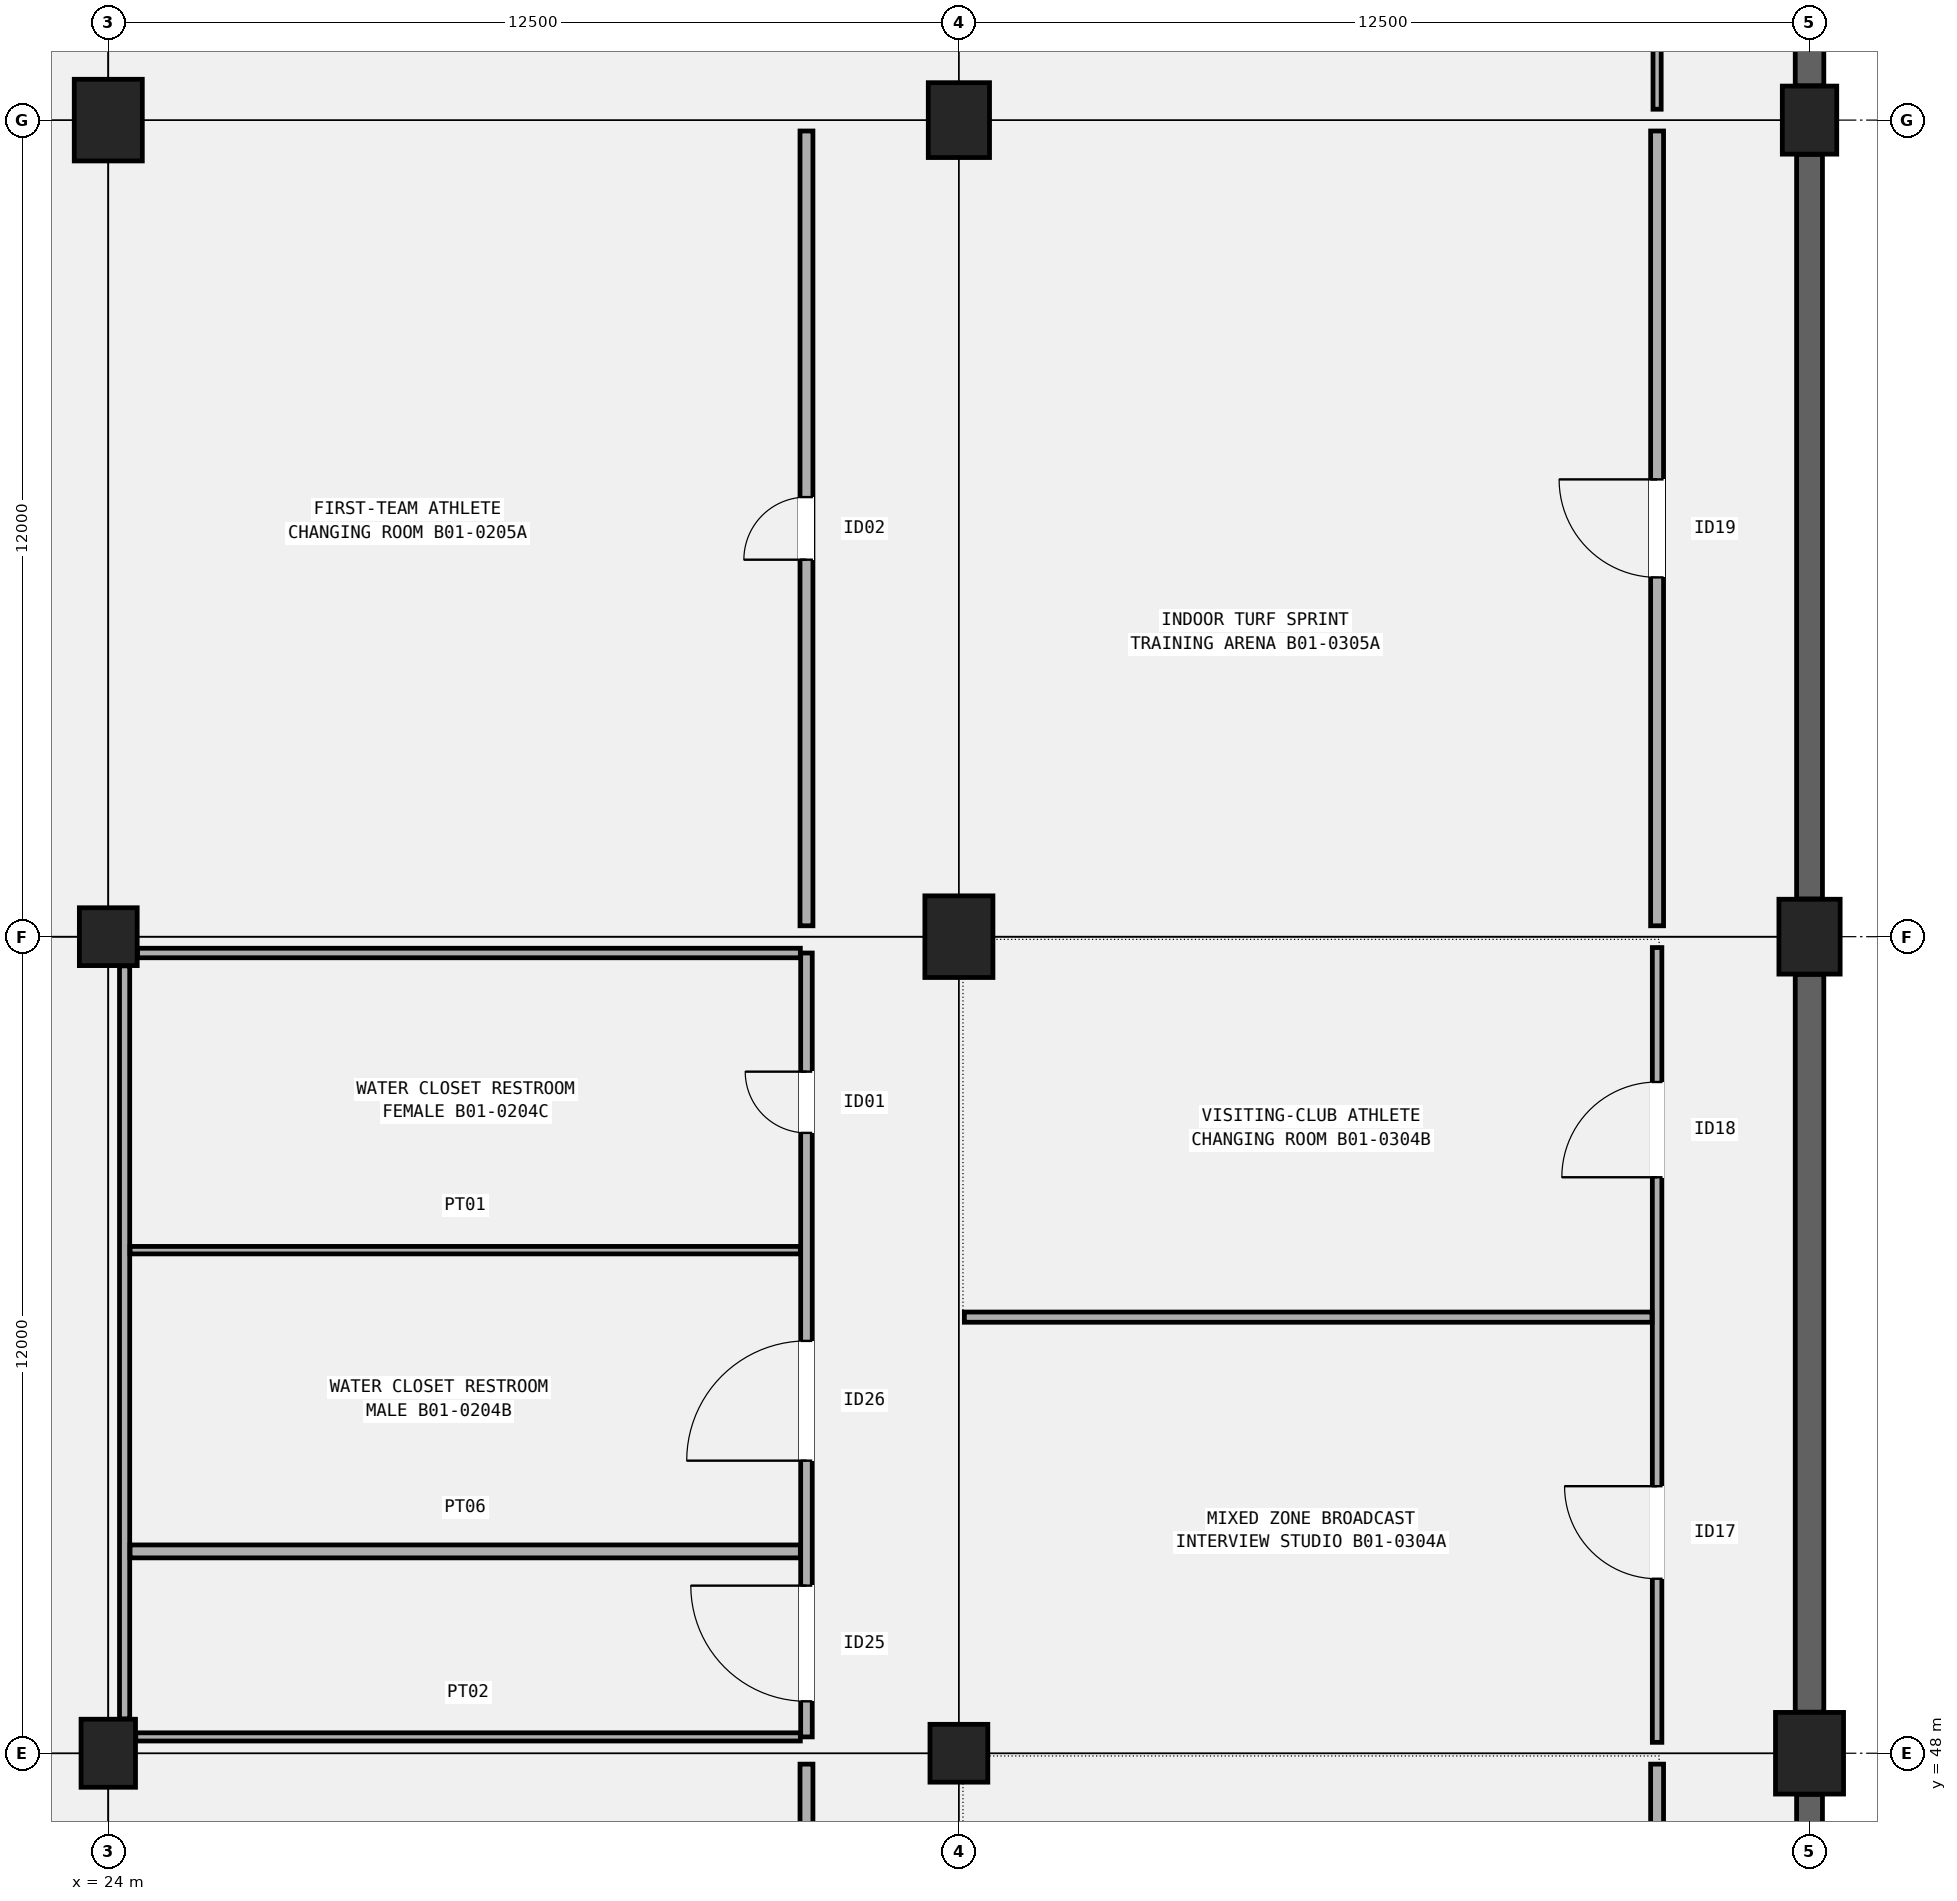
"""IFC4 building model, lengths in metres.
Left out: names, types, materials, properties, quantities, classifications, styles, units other than length and angle.
Written with IfcOpenShell. Run it as: python <this file> out.ifc"""

import sys

from ifc_helpers import new_model, si_unit, direction, frame, frame_2d, origin, origin_2d, place, context, subcontext, project, spatial, rectangle, circle, extrude, element, fill, save


model = new_model("IFC4")
c1 = context("Model", 3, precision=1e-05, world=origin(), true_north=direction((0.0, 1.0)))
c2 = subcontext(c1, "Body", "Model", "MODEL_VIEW")
j1 = project(units=[si_unit("LENGTHUNIT", "METRE"), si_unit("PLANEANGLEUNIT", "RADIAN")], contexts=[c1])
p1 = place(None, origin())
s1 = spatial("IfcSite", under=j1, at=p1, CompositionType="ELEMENT")
p2 = place(p1, origin())
s2 = spatial("IfcBuilding", under=s1, at=p2, CompositionType="ELEMENT")
p3 = place(p2, frame((0.0, 0.0, -4.8)))
s3 = spatial("IfcBuildingStorey", under=s2, at=p3, CompositionType="ELEMENT", Elevation=-4.8)
p4 = place(p3, frame((24.0, 48.0, 0.0), z_axis=(0.0, 0.0, 1.0), x_axis=(1.0, 0.0, 0.0)))
e1 = element("IfcColumn", 1, at=p4, inside=s3, PredefinedType="COLUMN", context=c2, shape_type="SweptSolid", body=[
    extrude(rectangle(XDim=0.8, YDim=1.0, at=origin_2d()), origin(), (0.0, 0.0, 1.0), 4.8),
])
p5 = place(p3, frame((24.0, 60.0, 0.0), z_axis=(0.0, 0.0, 1.0), x_axis=(1.0, 0.0, 0.0)))
e2 = element("IfcColumn", 2, at=p5, inside=s3, PredefinedType="COLUMN", context=c2, shape_type="SweptSolid", body=[
    extrude(circle(Radius=0.425, at=origin_2d()), origin(), (0.0, 0.0, 1.0), 4.8),
])
p6 = place(p3, frame((24.0, 72.0, 0.0), z_axis=(0.0, 0.0, 1.0), x_axis=(1.0, 0.0, 0.0)))
e3 = element("IfcColumn", 3, at=p6, inside=s3, PredefinedType="COLUMN", context=c2, shape_type="SweptSolid", body=[
    extrude(rectangle(XDim=1.0, YDim=1.2, at=origin_2d()), origin(), (0.0, 0.0, 1.0), 4.8),
])
p7 = place(p3, frame((36.5, 48.0, 0.0), z_axis=(0.0, 0.0, 1.0), x_axis=(1.0, 0.0, 0.0)))
e4 = element("IfcColumn", 4, at=p7, inside=s3, PredefinedType="COLUMN", context=c2, shape_type="SweptSolid", body=[
    extrude(circle(Radius=0.425, at=origin_2d()), origin(), (0.0, 0.0, 1.0), 4.8),
])
p8 = place(p3, frame((36.5, 60.0, 0.0), z_axis=(0.0, 0.0, 1.0), x_axis=(1.0, 0.0, 0.0)))
e5 = element("IfcColumn", 5, at=p8, inside=s3, PredefinedType="COLUMN", context=c2, shape_type="SweptSolid", body=[
    extrude(rectangle(XDim=1.0, YDim=1.2, at=origin_2d()), origin(), (0.0, 0.0, 1.0), 4.8),
])
p9 = place(p3, frame((36.5, 72.0, 0.0), z_axis=(0.0, 0.0, 1.0), x_axis=(1.0, 0.0, 0.0)))
e6 = element("IfcColumn", 6, at=p9, inside=s3, PredefinedType="COLUMN", context=c2, shape_type="SweptSolid", body=[
    extrude(rectangle(XDim=0.9, YDim=1.1, at=origin_2d()), origin(), (0.0, 0.0, 1.0), 4.8),
])
p10 = place(p3, frame((49.0, 48.0, 0.0), z_axis=(0.0, 0.0, 1.0), x_axis=(1.0, 0.0, 0.0)))
e7 = element("IfcColumn", 7, at=p10, inside=s3, PredefinedType="COLUMN", context=c2, shape_type="SweptSolid", body=[
    extrude(rectangle(XDim=1.0, YDim=1.2, at=origin_2d()), origin(), (0.0, 0.0, 1.0), 4.8),
])
p11 = place(p3, frame((49.0, 60.0, 0.0), z_axis=(0.0, 0.0, 1.0), x_axis=(1.0, 0.0, 0.0)))
e8 = element("IfcColumn", 8, at=p11, inside=s3, PredefinedType="COLUMN", context=c2, shape_type="SweptSolid", body=[
    extrude(rectangle(XDim=0.9, YDim=1.1, at=origin_2d()), origin(), (0.0, 0.0, 1.0), 4.8),
])
p12 = place(p3, frame((49.0, 72.0, 0.0), z_axis=(0.0, 0.0, 1.0), x_axis=(1.0, 0.0, 0.0)))
e9 = element("IfcColumn", 9, at=p12, inside=s3, PredefinedType="COLUMN", context=c2, shape_type="SweptSolid", body=[
    extrude(rectangle(XDim=0.8, YDim=1.0, at=origin_2d()), origin(), (0.0, 0.0, 1.0), 4.8),
])
p13 = place(p3, frame((49.0, 36.429, 0.0), z_axis=(0.0, 0.0, 1.0), x_axis=(0.0, 1.0, 0.0)))
e10 = element("IfcWall", 10, at=p13, inside=s3, PredefinedType="STANDARD", context=c2, shape_type="SweptSolid", body=[
    extrude(rectangle(XDim=10.967, YDim=0.38, at=frame_2d((5.483, 0.0))), origin(), (0.0, 0.0, 1.0), 4.46),
])
p14 = place(p3, frame((49.0, 48.604, 0.0), z_axis=(0.0, 0.0, 1.0), x_axis=(0.0, 1.0, 0.0)))
e11 = element("IfcWall", 11, at=p14, inside=s3, PredefinedType="STANDARD", context=c2, shape_type="SweptSolid", body=[
    extrude(rectangle(XDim=10.842, YDim=0.42, at=frame_2d((5.421, 0.0))), origin(), (0.0, 0.0, 1.0), 4.46),
])
p15 = place(p3, frame((49.0, 60.554, 0.0), z_axis=(0.0, 0.0, 1.0), x_axis=(0.0, 1.0, 0.0)))
e12 = element("IfcWall", 12, at=p15, inside=s3, PredefinedType="STANDARD", context=c2, shape_type="SweptSolid", body=[
    extrude(rectangle(XDim=10.942, YDim=0.38, at=frame_2d((5.471, 0.0))), origin(), (0.0, 0.0, 1.0), 4.46),
])
p16 = place(p3, frame((49.0, 72.504, 0.0), z_axis=(0.0, 0.0, 1.0), x_axis=(0.0, 1.0, 0.0)))
e13 = element("IfcWall", 13, at=p16, inside=s3, PredefinedType="STANDARD", context=c2, shape_type="SweptSolid", body=[
    extrude(rectangle(XDim=11.067, YDim=0.42, at=frame_2d((5.534, 0.0))), origin(), (0.0, 0.0, 1.0), 4.46),
])
p17 = place(p3, frame((34.26, 38.17, 0.0), z_axis=(0.0, 0.0, 1.0), x_axis=(0.0, 1.0, 0.0)))
e14 = element("IfcWall", 14, at=p17, inside=s3, PredefinedType="PARTITIONING", context=c2, shape_type="SweptSolid", body=[
    extrude(rectangle(XDim=9.67, YDim=0.19, at=frame_2d((4.835, 0.0))), origin(), (0.0, 0.0, 1.0), 3.92),
])
p18 = place(p17, frame((4.01, 0.0, 0.0)))
e15 = element("IfcOpeningElement", 15, at=p18, cuts=e14, PredefinedType="OPENING", context=c2, shape_type="SweptSolid", body=[
    extrude(rectangle(XDim=1.65, YDim=2.28, at=frame_2d((0.825, 1.14))), frame((0.0, 0.105, 0.0), z_axis=(0.0, -1.0, 0.0), x_axis=(1.0, 0.0, 0.0)), (0.0, 0.0, 1.0), 0.21),
])
p19 = place(p3, frame((34.26, 48.24, 0.0), z_axis=(0.0, 0.0, 1.0), x_axis=(0.0, 1.0, 0.0)))
e16 = element("IfcWall", 16, at=p19, inside=s3, PredefinedType="PARTITIONING", context=c2, shape_type="SweptSolid", body=[
    extrude(rectangle(XDim=11.52, YDim=0.17, at=frame_2d((5.76, 0.0))), origin(), (0.0, 0.0, 1.0), 3.92),
])
p20 = place(p19, frame((0.523, 0.0, 0.0)))
e17 = element("IfcOpeningElement", 17, at=p20, cuts=e16, PredefinedType="OPENING", context=c2, shape_type="SweptSolid", body=[
    extrude(rectangle(XDim=1.7, YDim=2.32, at=frame_2d((0.85, 1.16))), frame((0.0, 0.095, 0.0), z_axis=(0.0, -1.0, 0.0), x_axis=(1.0, 0.0, 0.0)), (0.0, 0.0, 1.0), 0.19),
])
p21 = place(p19, frame((4.06, 0.0, 0.0)))
e18 = element("IfcOpeningElement", 18, at=p21, cuts=e16, PredefinedType="OPENING", context=c2, shape_type="SweptSolid", body=[
    extrude(rectangle(XDim=1.76, YDim=2.3, at=frame_2d((0.88, 1.15))), frame((0.0, 0.095, 0.0), z_axis=(0.0, -1.0, 0.0), x_axis=(1.0, 0.0, 0.0)), (0.0, 0.0, 1.0), 0.19),
])
p22 = place(p19, frame((8.876, 0.0, 0.0)))
e19 = element("IfcOpeningElement", 19, at=p22, cuts=e16, PredefinedType="OPENING", context=c2, shape_type="SweptSolid", body=[
    extrude(rectangle(XDim=0.9, YDim=2.06, at=frame_2d((0.45, 1.03))), frame((0.0, 0.095, 0.0), z_axis=(0.0, -1.0, 0.0), x_axis=(1.0, 0.0, 0.0)), (0.0, 0.0, 1.0), 0.19),
])
p23 = place(p3, frame((24.404, 48.24, 0.0), z_axis=(0.0, 0.0, 1.0), x_axis=(1.0, 0.0, 0.0)))
e20 = element("IfcWall", 20, at=p23, inside=s3, PredefinedType="PARTITIONING", context=c2, shape_type="SweptSolid", body=[
    extrude(rectangle(XDim=9.766, YDim=0.12, at=frame_2d((4.883, 0.0))), origin(), (0.0, 0.0, 1.0), 3.52),
])
p24 = place(p3, frame((24.429, 59.76, 0.0), z_axis=(0.0, 0.0, 1.0), x_axis=(1.0, 0.0, 0.0)))
e21 = element("IfcWall", 21, at=p24, inside=s3, PredefinedType="PARTITIONING", context=c2, shape_type="SweptSolid", body=[
    extrude(rectangle(XDim=9.741, YDim=0.14, at=frame_2d((4.871, 0.0))), origin(), (0.0, 0.0, 1.0), 3.62),
])
p25 = place(p3, frame((24.24, 48.504, 0.0), z_axis=(0.0, 0.0, 1.0), x_axis=(0.0, 1.0, 0.0)))
e22 = element("IfcWall", 22, at=p25, inside=s3, PredefinedType="PARTITIONING", context=c2, shape_type="SweptSolid", body=[
    extrude(rectangle(XDim=11.067, YDim=0.15, at=frame_2d((5.534, 0.0))), origin(), (0.0, 0.0, 1.0), 3.52),
])
p26 = place(p3, frame((24.32, 50.966, 0.0), z_axis=(0.0, 0.0, 1.0), x_axis=(1.0, 0.0, 0.0)))
e23 = element("IfcWall", 23, at=p26, inside=s3, PredefinedType="PARTITIONING", context=c2, shape_type="SweptSolid", body=[
    extrude(rectangle(XDim=9.85, YDim=0.19, at=frame_2d((4.925, 0.0))), origin(), (0.0, 0.0, 1.0), 3.92),
])
p27 = place(p3, frame((24.32, 55.393, 0.0), z_axis=(0.0, 0.0, 1.0), x_axis=(1.0, 0.0, 0.0)))
e24 = element("IfcWall", 24, at=p27, inside=s3, PredefinedType="PARTITIONING", context=c2, shape_type="SweptSolid", body=[
    extrude(rectangle(XDim=9.85, YDim=0.11, at=frame_2d((4.925, 0.0))), origin(), (0.0, 0.0, 1.0), 3.92),
])
p28 = place(p3, frame((34.26, 60.16, 0.0), z_axis=(0.0, 0.0, 1.0), x_axis=(0.0, 1.0, 0.0)))
e25 = element("IfcWall", 25, at=p28, inside=s3, PredefinedType="PARTITIONING", context=c2, shape_type="SweptSolid", body=[
    extrude(rectangle(XDim=11.68, YDim=0.19, at=frame_2d((5.84, 0.0))), origin(), (0.0, 0.0, 1.0), 3.92),
])
p29 = place(p28, frame((5.38, 0.0, 0.0)))
e26 = element("IfcOpeningElement", 26, at=p29, cuts=e25, PredefinedType="OPENING", context=c2, shape_type="SweptSolid", body=[
    extrude(rectangle(XDim=0.92, YDim=2.1, at=frame_2d((0.46, 1.05))), frame((0.0, 0.105, 0.0), z_axis=(0.0, -1.0, 0.0), x_axis=(1.0, 0.0, 0.0)), (0.0, 0.0, 1.0), 0.21),
])
p30 = place(p3, frame((46.76, 38.17, 0.0), z_axis=(0.0, 0.0, 1.0), x_axis=(0.0, 1.0, 0.0)))
e27 = element("IfcWall", 27, at=p30, inside=s3, PredefinedType="PARTITIONING", context=c2, shape_type="SweptSolid", body=[
    extrude(rectangle(XDim=9.67, YDim=0.19, at=frame_2d((4.835, 0.0))), origin(), (0.0, 0.0, 1.0), 3.92),
])
p31 = place(p30, frame((1.021, 0.0, 0.0)))
e28 = element("IfcOpeningElement", 28, at=p31, cuts=e27, PredefinedType="OPENING", context=c2, shape_type="SweptSolid", body=[
    extrude(rectangle(XDim=1.3, YDim=2.24, at=frame_2d((0.65, 1.12))), frame((0.0, 0.105, 0.0), z_axis=(0.0, -1.0, 0.0), x_axis=(1.0, 0.0, 0.0)), (0.0, 0.0, 1.0), 0.21),
])
p32 = place(p30, frame((5.922, 0.0, 0.0)))
e29 = element("IfcOpeningElement", 29, at=p32, cuts=e27, PredefinedType="OPENING", context=c2, shape_type="SweptSolid", body=[
    extrude(rectangle(XDim=1.33, YDim=2.22, at=frame_2d((0.665, 1.11))), frame((0.0, 0.105, 0.0), z_axis=(0.0, -1.0, 0.0), x_axis=(1.0, 0.0, 0.0)), (0.0, 0.0, 1.0), 0.21),
])
p33 = place(p3, frame((46.76, 48.16, 0.0), z_axis=(0.0, 0.0, 1.0), x_axis=(0.0, 1.0, 0.0)))
e30 = element("IfcWall", 30, at=p33, inside=s3, PredefinedType="PARTITIONING", context=c2, shape_type="SweptSolid", body=[
    extrude(rectangle(XDim=11.68, YDim=0.14, at=frame_2d((5.84, 0.0))), origin(), (0.0, 0.0, 1.0), 3.92),
])
p34 = place(p33, frame((2.404, 0.0, 0.0)))
e31 = element("IfcOpeningElement", 31, at=p34, cuts=e30, PredefinedType="OPENING", context=c2, shape_type="SweptSolid", body=[
    extrude(rectangle(XDim=1.36, YDim=2.25, at=frame_2d((0.68, 1.125))), frame((0.0, 0.08, 0.0), z_axis=(0.0, -1.0, 0.0), x_axis=(1.0, 0.0, 0.0)), (0.0, 0.0, 1.0), 0.16),
])
p35 = place(p33, frame((8.304, 0.0, 0.0)))
e32 = element("IfcOpeningElement", 32, at=p35, cuts=e30, PredefinedType="OPENING", context=c2, shape_type="SweptSolid", body=[
    extrude(rectangle(XDim=1.4, YDim=2.24, at=frame_2d((0.7, 1.12))), frame((0.0, 0.08, 0.0), z_axis=(0.0, -1.0, 0.0), x_axis=(1.0, 0.0, 0.0)), (0.0, 0.0, 1.0), 0.16),
])
p36 = place(p3, frame((36.58, 54.409, 0.0), z_axis=(0.0, 0.0, 1.0), x_axis=(1.0, 0.0, 0.0)))
e33 = element("IfcWall", 33, at=p36, inside=s3, PredefinedType="PARTITIONING", context=c2, shape_type="SweptSolid", body=[
    extrude(rectangle(XDim=10.105, YDim=0.15, at=frame_2d((5.052, 0.0))), origin(), (0.0, 0.0, 1.0), 3.92),
])
p37 = place(p3, frame((46.76, 60.16, 0.0), z_axis=(0.0, 0.0, 1.0), x_axis=(0.0, 1.0, 0.0)))
e34 = element("IfcWall", 34, at=p37, inside=s3, PredefinedType="PARTITIONING", context=c2, shape_type="SweptSolid", body=[
    extrude(rectangle(XDim=11.68, YDim=0.19, at=frame_2d((5.84, 0.0))), origin(), (0.0, 0.0, 1.0), 3.92),
])
p38 = place(p37, frame((5.12, 0.0, 0.0)))
e35 = element("IfcOpeningElement", 35, at=p38, cuts=e34, PredefinedType="OPENING", context=c2, shape_type="SweptSolid", body=[
    extrude(rectangle(XDim=1.44, YDim=2.26, at=frame_2d((0.72, 1.13))), frame((0.0, 0.105, 0.0), z_axis=(0.0, -1.0, 0.0), x_axis=(1.0, 0.0, 0.0)), (0.0, 0.0, 1.0), 0.21),
])
p39 = place(p3, frame((46.76, 72.16, 0.0), z_axis=(0.0, 0.0, 1.0), x_axis=(0.0, 1.0, 0.0)))
e36 = element("IfcWall", 36, at=p39, inside=s3, PredefinedType="PARTITIONING", context=c2, shape_type="SweptSolid", body=[
    extrude(rectangle(XDim=11.68, YDim=0.12, at=frame_2d((5.84, 0.0))), origin(), (0.0, 0.0, 1.0), 3.92),
])
p40 = place(p39, frame((0.972, 0.0, 0.0)))
e37 = element("IfcOpeningElement", 37, at=p40, cuts=e36, PredefinedType="OPENING", context=c2, shape_type="SweptSolid", body=[
    extrude(rectangle(XDim=1.48, YDim=2.24, at=frame_2d((0.74, 1.12))), frame((0.0, 0.07, 0.0), z_axis=(0.0, -1.0, 0.0), x_axis=(1.0, 0.0, 0.0)), (0.0, 0.0, 1.0), 0.14),
])
p41 = place(p39, frame((6.872, 0.0, 0.0)))
e38 = element("IfcOpeningElement", 38, at=p41, cuts=e36, PredefinedType="OPENING", context=c2, shape_type="SweptSolid", body=[
    extrude(rectangle(XDim=1.52, YDim=2.28, at=frame_2d((0.76, 1.14))), frame((0.0, 0.07, 0.0), z_axis=(0.0, -1.0, 0.0), x_axis=(1.0, 0.0, 0.0)), (0.0, 0.0, 1.0), 0.14),
])
p42 = place(p20, origin())
e39 = element("IfcDoor", 39, at=p42, inside=s3, OperationType="SINGLE_SWING_RIGHT", PredefinedType="DOOR", context=c2, shape_type="SweptSolid", body=[
    extrude(rectangle(XDim=1.7, YDim=2.32, at=frame_2d((0.85, 1.16))), frame((0.0, 0.025, 0.0), z_axis=(0.0, -1.0, 0.0), x_axis=(1.0, 0.0, 0.0)), (0.0, 0.0, 1.0), 0.05),
])
fill(e17, e39)
p43 = place(p21, origin())
e40 = element("IfcDoor", 40, at=p43, inside=s3, OperationType="SINGLE_SWING_LEFT", PredefinedType="DOOR", context=c2, shape_type="SweptSolid", body=[
    extrude(rectangle(XDim=1.76, YDim=2.3, at=frame_2d((0.88, 1.15))), frame((0.0, 0.025, 0.0), z_axis=(0.0, -1.0, 0.0), x_axis=(1.0, 0.0, 0.0)), (0.0, 0.0, 1.0), 0.05),
])
fill(e18, e40)
p44 = place(p22, origin())
e41 = element("IfcDoor", 41, at=p44, inside=s3, OperationType="SINGLE_SWING_RIGHT", PredefinedType="DOOR", context=c2, shape_type="SweptSolid", body=[
    extrude(rectangle(XDim=0.9, YDim=2.06, at=frame_2d((0.45, 1.03))), frame((0.0, 0.025, 0.0), z_axis=(0.0, -1.0, 0.0), x_axis=(1.0, 0.0, 0.0)), (0.0, 0.0, 1.0), 0.05),
])
fill(e19, e41)
p45 = place(p29, origin())
e42 = element("IfcDoor", 42, at=p45, inside=s3, OperationType="SINGLE_SWING_LEFT", PredefinedType="DOOR", context=c2, shape_type="SweptSolid", body=[
    extrude(rectangle(XDim=0.92, YDim=2.1, at=frame_2d((0.46, 1.05))), frame((0.0, 0.025, 0.0), z_axis=(0.0, -1.0, 0.0), x_axis=(1.0, 0.0, 0.0)), (0.0, 0.0, 1.0), 0.05),
])
fill(e26, e42)
p46 = place(p34, origin())
e43 = element("IfcDoor", 43, at=p46, inside=s3, OperationType="SINGLE_SWING_RIGHT", PredefinedType="DOOR", context=c2, shape_type="SweptSolid", body=[
    extrude(rectangle(XDim=1.36, YDim=2.25, at=frame_2d((0.68, 1.125))), frame((0.0, 0.025, 0.0), z_axis=(0.0, -1.0, 0.0), x_axis=(1.0, 0.0, 0.0)), (0.0, 0.0, 1.0), 0.05),
])
fill(e31, e43)
p47 = place(p35, origin())
e44 = element("IfcDoor", 44, at=p47, inside=s3, OperationType="SINGLE_SWING_LEFT", PredefinedType="DOOR", context=c2, shape_type="SweptSolid", body=[
    extrude(rectangle(XDim=1.4, YDim=2.24, at=frame_2d((0.7, 1.12))), frame((0.0, 0.025, 0.0), z_axis=(0.0, -1.0, 0.0), x_axis=(1.0, 0.0, 0.0)), (0.0, 0.0, 1.0), 0.05),
])
fill(e32, e44)
p48 = place(p38, origin())
e45 = element("IfcDoor", 45, at=p48, inside=s3, OperationType="SINGLE_SWING_RIGHT", PredefinedType="DOOR", context=c2, shape_type="SweptSolid", body=[
    extrude(rectangle(XDim=1.44, YDim=2.26, at=frame_2d((0.72, 1.13))), frame((0.0, 0.025, 0.0), z_axis=(0.0, -1.0, 0.0), x_axis=(1.0, 0.0, 0.0)), (0.0, 0.0, 1.0), 0.05),
])
fill(e35, e45)
save(model, sys.argv[1])
